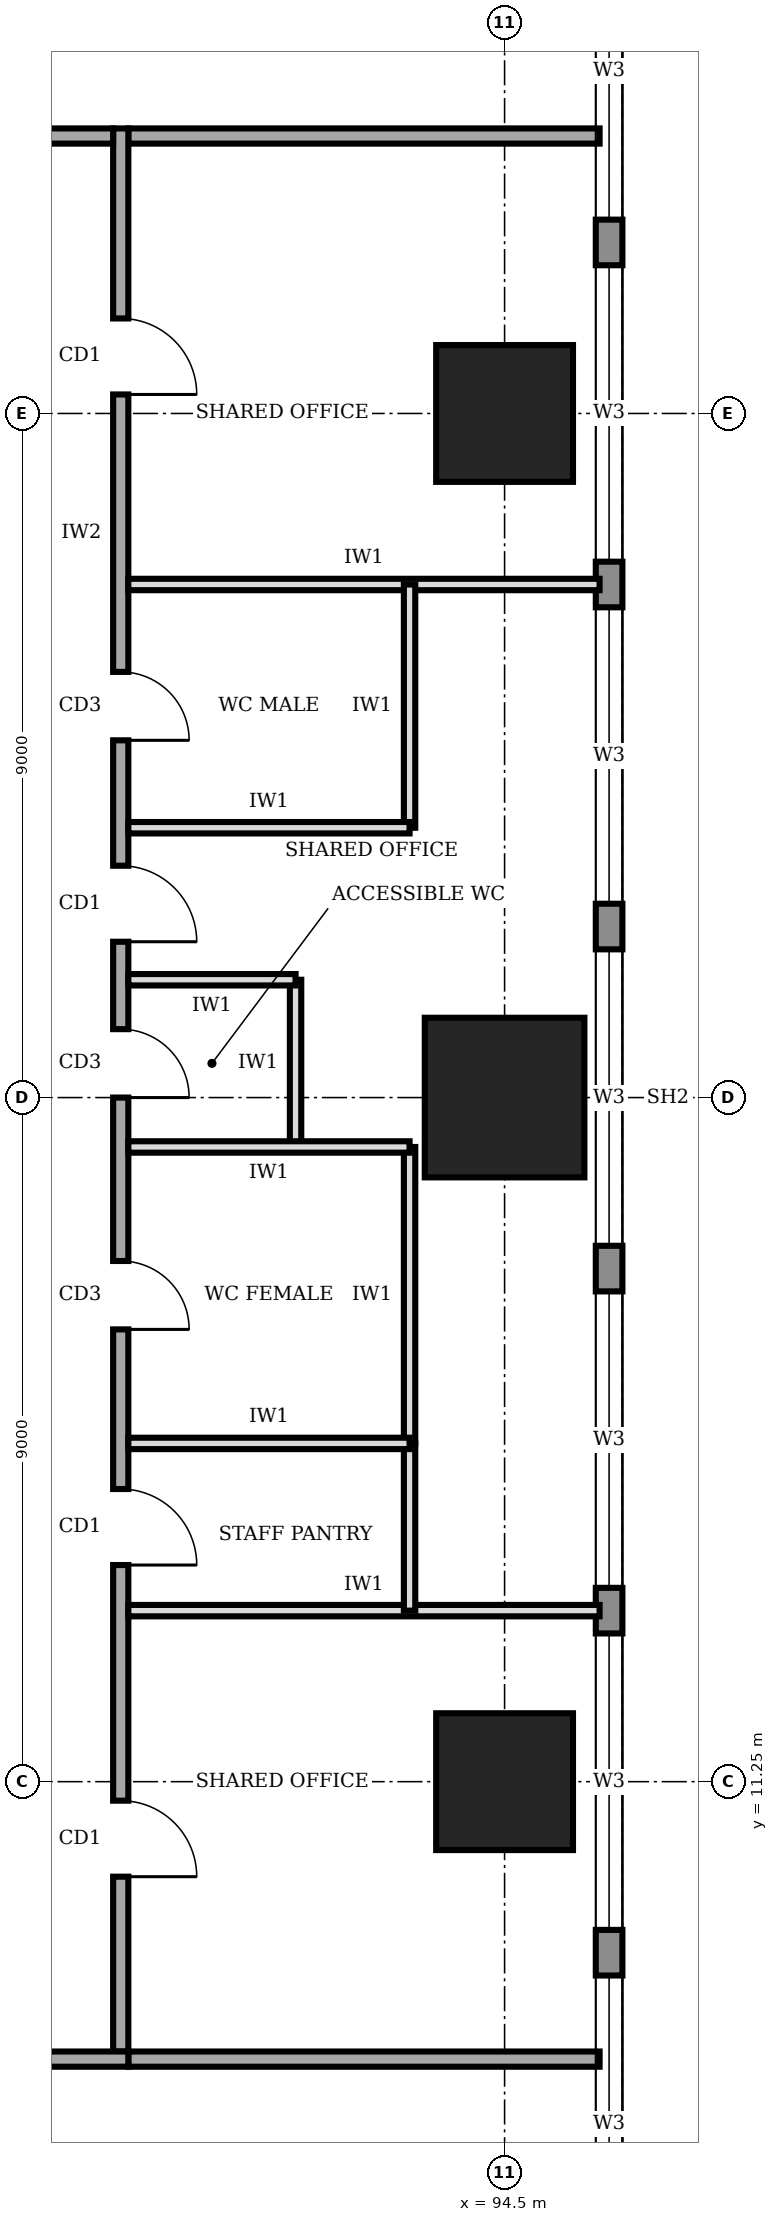
"""IFC4 building model, lengths in metres.
Left out: names, types, materials, properties, quantities, classifications, styles, units other than length and angle.
Written with IfcOpenShell. Run it as: python <this file> out.ifc"""

import sys

from ifc_helpers import new_model, si_unit, direction, frame, frame_2d, origin, origin_2d, place, context, subcontext, project, spatial, rectangle, extrude, element, fill, save


model = new_model("IFC4")
c1 = context("Model", 3, precision=1e-05, world=origin(), true_north=direction((0.0, 1.0)))
c2 = subcontext(c1, "Body", "Model", "MODEL_VIEW")
j1 = project(units=[si_unit("LENGTHUNIT", "METRE"), si_unit("PLANEANGLEUNIT", "RADIAN")], contexts=[c1])
p1 = place(None, origin())
s1 = spatial("IfcSite", under=j1, at=p1, CompositionType="ELEMENT")
p2 = place(p1, origin())
s2 = spatial("IfcBuilding", under=s1, at=p2, CompositionType="ELEMENT")
p3 = place(p2, frame((0.0, 0.0, 189.0)))
s3 = spatial("IfcBuildingStorey", under=s2, at=p3, CompositionType="ELEMENT", Elevation=189.0)
p4 = place(p3, frame((94.5, 11.25, 0.0), z_axis=(0.0, 0.0, 1.0), x_axis=(1.0, 0.0, 0.0)))
e1 = element("IfcColumn", 1, at=p4, inside=s3, PredefinedType="COLUMN", context=c2, shape_type="SweptSolid", body=[
    extrude(rectangle(XDim=1.8, YDim=1.8, at=origin_2d()), origin(), (0.0, 0.0, 1.0), 4.0),
])
p5 = place(p3, frame((94.5, 20.25, 0.0), z_axis=(0.0, 0.0, 1.0), x_axis=(1.0, 0.0, 0.0)))
e2 = element("IfcColumn", 2, at=p5, inside=s3, PredefinedType="COLUMN", context=c2, shape_type="SweptSolid", body=[
    extrude(rectangle(XDim=2.1, YDim=2.1, at=origin_2d()), origin(), (0.0, 0.0, 1.0), 4.0),
])
p6 = place(p3, frame((94.5, 29.25, 0.0), z_axis=(0.0, 0.0, 1.0), x_axis=(1.0, 0.0, 0.0)))
e3 = element("IfcColumn", 3, at=p6, inside=s3, PredefinedType="COLUMN", context=c2, shape_type="SweptSolid", body=[
    extrude(rectangle(XDim=1.8, YDim=1.8, at=origin_2d()), origin(), (0.0, 0.0, 1.0), 4.0),
])
p7 = place(p3, frame((95.875, 3.32, 0.0), z_axis=(0.0, 0.0, 1.0), x_axis=(0.0, 1.0, 0.0)))
e4 = element("IfcWall", 4, at=p7, inside=s3, PredefinedType="STANDARD", context=c2, shape_type="SweptSolid", body=[
    extrude(rectangle(XDim=33.86, YDim=0.35, at=frame_2d((16.93, 0.0))), origin(), (0.0, 0.0, 1.0), 3.75),
])
p8 = place(p7, frame((1.48, 0.0, 0.95)))
e5 = element("IfcOpeningElement", 5, at=p8, cuts=e4, PredefinedType="OPENING", context=c2, shape_type="SweptSolid", body=[
    extrude(rectangle(XDim=3.9, YDim=1.8, at=frame_2d((1.95, 0.9))), frame((0.0, 0.185, 0.0), z_axis=(0.0, -1.0, 0.0), x_axis=(1.0, 0.0, 0.0)), (0.0, 0.0, 1.0), 0.37),
])
p9 = place(p7, frame((5.98, 0.0, 0.95)))
e6 = element("IfcOpeningElement", 6, at=p9, cuts=e4, PredefinedType="OPENING", context=c2, shape_type="SweptSolid", body=[
    extrude(rectangle(XDim=3.9, YDim=1.8, at=frame_2d((1.95, 0.9))), frame((0.0, 0.185, 0.0), z_axis=(0.0, -1.0, 0.0), x_axis=(1.0, 0.0, 0.0)), (0.0, 0.0, 1.0), 0.37),
])
p10 = place(p7, frame((10.48, 0.0, 0.95)))
e7 = element("IfcOpeningElement", 7, at=p10, cuts=e4, PredefinedType="OPENING", context=c2, shape_type="SweptSolid", body=[
    extrude(rectangle(XDim=3.9, YDim=1.8, at=frame_2d((1.95, 0.9))), frame((0.0, 0.185, 0.0), z_axis=(0.0, -1.0, 0.0), x_axis=(1.0, 0.0, 0.0)), (0.0, 0.0, 1.0), 0.37),
])
p11 = place(p7, frame((14.98, 0.0, 0.95)))
e8 = element("IfcOpeningElement", 8, at=p11, cuts=e4, PredefinedType="OPENING", context=c2, shape_type="SweptSolid", body=[
    extrude(rectangle(XDim=3.9, YDim=1.8, at=frame_2d((1.95, 0.9))), frame((0.0, 0.185, 0.0), z_axis=(0.0, -1.0, 0.0), x_axis=(1.0, 0.0, 0.0)), (0.0, 0.0, 1.0), 0.37),
])
p12 = place(p7, frame((19.48, 0.0, 0.95)))
e9 = element("IfcOpeningElement", 9, at=p12, cuts=e4, PredefinedType="OPENING", context=c2, shape_type="SweptSolid", body=[
    extrude(rectangle(XDim=3.9, YDim=1.8, at=frame_2d((1.95, 0.9))), frame((0.0, 0.185, 0.0), z_axis=(0.0, -1.0, 0.0), x_axis=(1.0, 0.0, 0.0)), (0.0, 0.0, 1.0), 0.37),
])
p13 = place(p7, frame((23.98, 0.0, 0.95)))
e10 = element("IfcOpeningElement", 10, at=p13, cuts=e4, PredefinedType="OPENING", context=c2, shape_type="SweptSolid", body=[
    extrude(rectangle(XDim=3.9, YDim=1.8, at=frame_2d((1.95, 0.9))), frame((0.0, 0.185, 0.0), z_axis=(0.0, -1.0, 0.0), x_axis=(1.0, 0.0, 0.0)), (0.0, 0.0, 1.0), 0.37),
])
p14 = place(p7, frame((28.48, 0.0, 0.95)))
e11 = element("IfcOpeningElement", 11, at=p14, cuts=e4, PredefinedType="OPENING", context=c2, shape_type="SweptSolid", body=[
    extrude(rectangle(XDim=3.9, YDim=1.8, at=frame_2d((1.95, 0.9))), frame((0.0, 0.185, 0.0), z_axis=(0.0, -1.0, 0.0), x_axis=(1.0, 0.0, 0.0)), (0.0, 0.0, 1.0), 0.37),
])
p15 = place(p3, frame((72.65, 7.6, 0.0), z_axis=(0.0, 0.0, 1.0), x_axis=(1.0, 0.0, 0.0)))
e12 = element("IfcWall", 12, at=p15, inside=s3, PredefinedType="SOLIDWALL", context=c2, shape_type="SweptSolid", body=[
    extrude(rectangle(XDim=16.9, YDim=0.2, at=frame_2d((8.45, 0.0))), origin(), (0.0, 0.0, 1.0), 3.75),
])
p16 = place(p15, frame((3.575, 0.0, 0.0)))
e13 = element("IfcOpeningElement", 13, at=p16, cuts=e12, PredefinedType="OPENING", context=c2, shape_type="SweptSolid", body=[
    extrude(rectangle(XDim=1.0, YDim=2.1, at=frame_2d((0.5, 1.05))), frame((0.0, 0.11, 0.0), z_axis=(0.0, -1.0, 0.0), x_axis=(1.0, 0.0, 0.0)), (0.0, 0.0, 1.0), 0.22),
])
p17 = place(p3, frame((89.45, 7.7, 0.0), z_axis=(0.0, 0.0, 1.0), x_axis=(0.0, 1.0, 0.0)))
e14 = element("IfcWall", 14, at=p17, inside=s3, PredefinedType="SOLIDWALL", context=c2, shape_type="SweptSolid", body=[
    extrude(rectangle(XDim=25.3, YDim=0.2, at=frame_2d((12.65, 0.0))), origin(), (0.0, 0.0, 1.0), 3.75),
])
p18 = place(p17, frame((2.3, 0.0, 0.0)))
e15 = element("IfcOpeningElement", 15, at=p18, cuts=e14, PredefinedType="OPENING", context=c2, shape_type="SweptSolid", body=[
    extrude(rectangle(XDim=1.0, YDim=2.1, at=frame_2d((0.5, 1.05))), frame((0.0, 0.11, 0.0), z_axis=(0.0, -1.0, 0.0), x_axis=(1.0, 0.0, 0.0)), (0.0, 0.0, 1.0), 0.22),
])
p19 = place(p17, frame((6.4, 0.0, 0.0)))
e16 = element("IfcOpeningElement", 16, at=p19, cuts=e14, PredefinedType="OPENING", context=c2, shape_type="SweptSolid", body=[
    extrude(rectangle(XDim=1.0, YDim=2.1, at=frame_2d((0.5, 1.05))), frame((0.0, 0.11, 0.0), z_axis=(0.0, -1.0, 0.0), x_axis=(1.0, 0.0, 0.0)), (0.0, 0.0, 1.0), 0.22),
])
p20 = place(p17, frame((9.5, 0.0, 0.0)))
e17 = element("IfcOpeningElement", 17, at=p20, cuts=e14, PredefinedType="OPENING", context=c2, shape_type="SweptSolid", body=[
    extrude(rectangle(XDim=0.9, YDim=2.1, at=frame_2d((0.45, 1.05))), frame((0.0, 0.11, 0.0), z_axis=(0.0, -1.0, 0.0), x_axis=(1.0, 0.0, 0.0)), (0.0, 0.0, 1.0), 0.22),
])
p21 = place(p17, frame((12.55, 0.0, 0.0)))
e18 = element("IfcOpeningElement", 18, at=p21, cuts=e14, PredefinedType="OPENING", context=c2, shape_type="SweptSolid", body=[
    extrude(rectangle(XDim=0.9, YDim=2.1, at=frame_2d((0.45, 1.05))), frame((0.0, 0.11, 0.0), z_axis=(0.0, -1.0, 0.0), x_axis=(1.0, 0.0, 0.0)), (0.0, 0.0, 1.0), 0.22),
])
p22 = place(p17, frame((17.25, 0.0, 0.0)))
e19 = element("IfcOpeningElement", 19, at=p22, cuts=e14, PredefinedType="OPENING", context=c2, shape_type="SweptSolid", body=[
    extrude(rectangle(XDim=0.9, YDim=2.1, at=frame_2d((0.45, 1.05))), frame((0.0, 0.11, 0.0), z_axis=(0.0, -1.0, 0.0), x_axis=(1.0, 0.0, 0.0)), (0.0, 0.0, 1.0), 0.22),
])
p23 = place(p17, frame((14.6, 0.0, 0.0)))
e20 = element("IfcOpeningElement", 20, at=p23, cuts=e14, PredefinedType="OPENING", context=c2, shape_type="SweptSolid", body=[
    extrude(rectangle(XDim=1.0, YDim=2.1, at=frame_2d((0.5, 1.05))), frame((0.0, 0.11, 0.0), z_axis=(0.0, -1.0, 0.0), x_axis=(1.0, 0.0, 0.0)), (0.0, 0.0, 1.0), 0.22),
])
p24 = place(p17, frame((21.8, 0.0, 0.0)))
e21 = element("IfcOpeningElement", 21, at=p24, cuts=e14, PredefinedType="OPENING", context=c2, shape_type="SweptSolid", body=[
    extrude(rectangle(XDim=1.0, YDim=2.1, at=frame_2d((0.5, 1.05))), frame((0.0, 0.11, 0.0), z_axis=(0.0, -1.0, 0.0), x_axis=(1.0, 0.0, 0.0)), (0.0, 0.0, 1.0), 0.22),
])
p25 = place(p3, frame((89.35, 32.9, 0.0), z_axis=(0.0, 0.0, 1.0), x_axis=(-1.0, 0.0, 0.0)))
e22 = element("IfcWall", 22, at=p25, inside=s3, PredefinedType="SOLIDWALL", context=c2, shape_type="SweptSolid", body=[
    extrude(rectangle(XDim=16.9, YDim=0.2, at=frame_2d((8.45, 0.0))), origin(), (0.0, 0.0, 1.0), 3.75),
])
p26 = place(p25, frame((14.375, 0.0, 0.0)))
e23 = element("IfcOpeningElement", 23, at=p26, cuts=e22, PredefinedType="OPENING", context=c2, shape_type="SweptSolid", body=[
    extrude(rectangle(XDim=1.0, YDim=2.1, at=frame_2d((0.5, 1.05))), frame((0.0, 0.11, 0.0), z_axis=(0.0, -1.0, 0.0), x_axis=(1.0, 0.0, 0.0)), (0.0, 0.0, 1.0), 0.22),
])
for number, where, z_axis, x_axis in (
    (24, (89.55, 7.6, 0.0), (0.0, 0.0, 1.0), (1.0, 0.0, 0.0)),
    (25, (89.55, 32.9, 0.0), (0.0, 0.0, 1.0), (1.0, 0.0, 0.0)),
):
    element("IfcWall", number, at=place(p3, frame(where, z_axis=z_axis, x_axis=x_axis)), inside=s3, PredefinedType="SOLIDWALL", context=c2, shape_type="SweptSolid", body=[
        extrude(rectangle(XDim=6.2, YDim=0.2, at=frame_2d((3.1, 0.0))), origin(), (0.0, 0.0, 1.0), 3.75),
    ])
for number, where, z_axis, x_axis in (
    (26, (89.55, 13.5, 0.0), (0.0, 0.0, 1.0), (1.0, 0.0, 0.0)),
    (27, (89.55, 27.0, 0.0), (0.0, 0.0, 1.0), (1.0, 0.0, 0.0)),
):
    element("IfcWall", number, at=place(p3, frame(where, z_axis=z_axis, x_axis=x_axis)), inside=s3, PredefinedType="PARTITIONING", context=c2, shape_type="SweptSolid", body=[
        extrude(rectangle(XDim=6.2, YDim=0.15, at=frame_2d((3.1, 0.0))), origin(), (0.0, 0.0, 1.0), 3.75),
    ])
p27 = place(p3, frame((89.55, 15.7, 0.0), z_axis=(0.0, 0.0, 1.0), x_axis=(1.0, 0.0, 0.0)))
e28 = element("IfcWall", 28, at=p27, inside=s3, PredefinedType="PARTITIONING", context=c2, shape_type="SweptSolid", body=[
    extrude(rectangle(XDim=3.7, YDim=0.15, at=frame_2d((1.85, 0.0))), origin(), (0.0, 0.0, 1.0), 3.75),
])
p28 = place(p3, frame((89.55, 19.6, 0.0), z_axis=(0.0, 0.0, 1.0), x_axis=(1.0, 0.0, 0.0)))
e29 = element("IfcWall", 29, at=p28, inside=s3, PredefinedType="PARTITIONING", context=c2, shape_type="SweptSolid", body=[
    extrude(rectangle(XDim=3.7, YDim=0.15, at=frame_2d((1.85, 0.0))), origin(), (0.0, 0.0, 1.0), 2.85),
])
p29 = place(p3, frame((89.55, 21.8, 0.0), z_axis=(0.0, 0.0, 1.0), x_axis=(1.0, 0.0, 0.0)))
e30 = element("IfcWall", 30, at=p29, inside=s3, PredefinedType="PARTITIONING", context=c2, shape_type="SweptSolid", body=[
    extrude(rectangle(XDim=2.2, YDim=0.15, at=frame_2d((1.1, 0.0))), origin(), (0.0, 0.0, 1.0), 3.75),
])
p30 = place(p3, frame((89.55, 23.8, 0.0), z_axis=(0.0, 0.0, 1.0), x_axis=(1.0, 0.0, 0.0)))
e31 = element("IfcWall", 31, at=p30, inside=s3, PredefinedType="PARTITIONING", context=c2, shape_type="SweptSolid", body=[
    extrude(rectangle(XDim=3.7, YDim=0.15, at=frame_2d((1.85, 0.0))), origin(), (0.0, 0.0, 1.0), 3.75),
])
p31 = place(p3, frame((93.25, 13.5, 0.0), z_axis=(0.0, 0.0, 1.0), x_axis=(0.0, 1.0, 0.0)))
e32 = element("IfcWall", 32, at=p31, inside=s3, PredefinedType="PARTITIONING", context=c2, shape_type="SweptSolid", body=[
    extrude(rectangle(XDim=2.2, YDim=0.15, at=frame_2d((1.1, 0.0))), origin(), (0.0, 0.0, 1.0), 3.75),
])
p32 = place(p3, frame((93.25, 15.7, 0.0), z_axis=(0.0, 0.0, 1.0), x_axis=(0.0, 1.0, 0.0)))
e33 = element("IfcWall", 33, at=p32, inside=s3, PredefinedType="PARTITIONING", context=c2, shape_type="SweptSolid", body=[
    extrude(rectangle(XDim=3.9, YDim=0.15, at=frame_2d((1.95, 0.0))), origin(), (0.0, 0.0, 1.0), 3.75),
])
p33 = place(p3, frame((91.75, 19.6, 0.0), z_axis=(0.0, 0.0, 1.0), x_axis=(0.0, 1.0, 0.0)))
e34 = element("IfcWall", 34, at=p33, inside=s3, PredefinedType="PARTITIONING", context=c2, shape_type="SweptSolid", body=[
    extrude(rectangle(XDim=2.2, YDim=0.15, at=frame_2d((1.1, 0.0))), origin(), (0.0, 0.0, 1.0), 3.75),
])
p34 = place(p3, frame((93.25, 23.8, 0.0), z_axis=(0.0, 0.0, 1.0), x_axis=(0.0, 1.0, 0.0)))
e35 = element("IfcWall", 35, at=p34, inside=s3, PredefinedType="PARTITIONING", context=c2, shape_type="SweptSolid", body=[
    extrude(rectangle(XDim=3.2, YDim=0.15, at=frame_2d((1.6, 0.0))), origin(), (0.0, 0.0, 1.0), 3.75),
])
p35 = place(p8, origin())
e36 = element("IfcWindow", 36, at=p35, inside=s3, PartitioningType="SINGLE_PANEL", PredefinedType="WINDOW", context=c2, shape_type="SweptSolid", body=[
    extrude(rectangle(XDim=3.9, YDim=1.8, at=frame_2d((1.95, 0.9))), frame((0.0, 0.03, 0.0), z_axis=(0.0, -1.0, 0.0), x_axis=(1.0, 0.0, 0.0)), (0.0, 0.0, 1.0), 0.06),
])
fill(e5, e36)
p36 = place(p9, origin())
e37 = element("IfcWindow", 37, at=p36, inside=s3, PartitioningType="SINGLE_PANEL", PredefinedType="WINDOW", context=c2, shape_type="SweptSolid", body=[
    extrude(rectangle(XDim=3.9, YDim=1.8, at=frame_2d((1.95, 0.9))), frame((0.0, 0.03, 0.0), z_axis=(0.0, -1.0, 0.0), x_axis=(1.0, 0.0, 0.0)), (0.0, 0.0, 1.0), 0.06),
])
fill(e6, e37)
p37 = place(p10, origin())
e38 = element("IfcWindow", 38, at=p37, inside=s3, PartitioningType="SINGLE_PANEL", PredefinedType="WINDOW", context=c2, shape_type="SweptSolid", body=[
    extrude(rectangle(XDim=3.9, YDim=1.8, at=frame_2d((1.95, 0.9))), frame((0.0, 0.03, 0.0), z_axis=(0.0, -1.0, 0.0), x_axis=(1.0, 0.0, 0.0)), (0.0, 0.0, 1.0), 0.06),
])
fill(e7, e38)
p38 = place(p11, origin())
e39 = element("IfcWindow", 39, at=p38, inside=s3, PartitioningType="SINGLE_PANEL", PredefinedType="WINDOW", context=c2, shape_type="SweptSolid", body=[
    extrude(rectangle(XDim=3.9, YDim=1.8, at=frame_2d((1.95, 0.9))), frame((0.0, 0.03, 0.0), z_axis=(0.0, -1.0, 0.0), x_axis=(1.0, 0.0, 0.0)), (0.0, 0.0, 1.0), 0.06),
])
fill(e8, e39)
p39 = place(p12, origin())
e40 = element("IfcWindow", 40, at=p39, inside=s3, PartitioningType="SINGLE_PANEL", PredefinedType="WINDOW", context=c2, shape_type="SweptSolid", body=[
    extrude(rectangle(XDim=3.9, YDim=1.8, at=frame_2d((1.95, 0.9))), frame((0.0, 0.03, 0.0), z_axis=(0.0, -1.0, 0.0), x_axis=(1.0, 0.0, 0.0)), (0.0, 0.0, 1.0), 0.06),
])
fill(e9, e40)
p40 = place(p13, origin())
e41 = element("IfcWindow", 41, at=p40, inside=s3, PartitioningType="SINGLE_PANEL", PredefinedType="WINDOW", context=c2, shape_type="SweptSolid", body=[
    extrude(rectangle(XDim=3.9, YDim=1.8, at=frame_2d((1.95, 0.9))), frame((0.0, 0.03, 0.0), z_axis=(0.0, -1.0, 0.0), x_axis=(1.0, 0.0, 0.0)), (0.0, 0.0, 1.0), 0.06),
])
fill(e10, e41)
p41 = place(p14, origin())
e42 = element("IfcWindow", 42, at=p41, inside=s3, PartitioningType="SINGLE_PANEL", PredefinedType="WINDOW", context=c2, shape_type="SweptSolid", body=[
    extrude(rectangle(XDim=3.9, YDim=1.8, at=frame_2d((1.95, 0.9))), frame((0.0, 0.03, 0.0), z_axis=(0.0, -1.0, 0.0), x_axis=(1.0, 0.0, 0.0)), (0.0, 0.0, 1.0), 0.06),
])
fill(e11, e42)
p42 = place(p18, frame((1.0, 0.0, 0.0), z_axis=(0.0, 0.0, 1.0), x_axis=(-1.0, 0.0, 0.0)))
e43 = element("IfcDoor", 43, at=p42, inside=s3, OperationType="SINGLE_SWING_RIGHT", PredefinedType="DOOR", context=c2, shape_type="SweptSolid", body=[
    extrude(rectangle(XDim=1.0, YDim=2.1, at=frame_2d((0.5, 1.05))), frame((0.0, 0.025, 0.0), z_axis=(0.0, -1.0, 0.0), x_axis=(1.0, 0.0, 0.0)), (0.0, 0.0, 1.0), 0.05),
])
fill(e15, e43)
p43 = place(p19, frame((1.0, 0.0, 0.0), z_axis=(0.0, 0.0, 1.0), x_axis=(-1.0, 0.0, 0.0)))
e44 = element("IfcDoor", 44, at=p43, inside=s3, OperationType="SINGLE_SWING_RIGHT", PredefinedType="DOOR", context=c2, shape_type="SweptSolid", body=[
    extrude(rectangle(XDim=1.0, YDim=2.1, at=frame_2d((0.5, 1.05))), frame((0.0, 0.025, 0.0), z_axis=(0.0, -1.0, 0.0), x_axis=(1.0, 0.0, 0.0)), (0.0, 0.0, 1.0), 0.05),
])
fill(e16, e44)
p44 = place(p20, frame((0.9, 0.0, 0.0), z_axis=(0.0, 0.0, 1.0), x_axis=(-1.0, 0.0, 0.0)))
e45 = element("IfcDoor", 45, at=p44, inside=s3, OperationType="SINGLE_SWING_RIGHT", PredefinedType="DOOR", context=c2, shape_type="SweptSolid", body=[
    extrude(rectangle(XDim=0.9, YDim=2.1, at=frame_2d((0.45, 1.05))), frame((0.0, 0.025, 0.0), z_axis=(0.0, -1.0, 0.0), x_axis=(1.0, 0.0, 0.0)), (0.0, 0.0, 1.0), 0.05),
])
fill(e17, e45)
p45 = place(p21, frame((0.9, 0.0, 0.0), z_axis=(0.0, 0.0, 1.0), x_axis=(-1.0, 0.0, 0.0)))
e46 = element("IfcDoor", 46, at=p45, inside=s3, OperationType="SINGLE_SWING_RIGHT", PredefinedType="DOOR", context=c2, shape_type="SweptSolid", body=[
    extrude(rectangle(XDim=0.9, YDim=2.1, at=frame_2d((0.45, 1.05))), frame((0.0, 0.025, 0.0), z_axis=(0.0, -1.0, 0.0), x_axis=(1.0, 0.0, 0.0)), (0.0, 0.0, 1.0), 0.05),
])
fill(e18, e46)
p46 = place(p22, frame((0.9, 0.0, 0.0), z_axis=(0.0, 0.0, 1.0), x_axis=(-1.0, 0.0, 0.0)))
e47 = element("IfcDoor", 47, at=p46, inside=s3, OperationType="SINGLE_SWING_RIGHT", PredefinedType="DOOR", context=c2, shape_type="SweptSolid", body=[
    extrude(rectangle(XDim=0.9, YDim=2.1, at=frame_2d((0.45, 1.05))), frame((0.0, 0.025, 0.0), z_axis=(0.0, -1.0, 0.0), x_axis=(1.0, 0.0, 0.0)), (0.0, 0.0, 1.0), 0.05),
])
fill(e19, e47)
p47 = place(p23, frame((1.0, 0.0, 0.0), z_axis=(0.0, 0.0, 1.0), x_axis=(-1.0, 0.0, 0.0)))
e48 = element("IfcDoor", 48, at=p47, inside=s3, OperationType="SINGLE_SWING_RIGHT", PredefinedType="DOOR", context=c2, shape_type="SweptSolid", body=[
    extrude(rectangle(XDim=1.0, YDim=2.1, at=frame_2d((0.5, 1.05))), frame((0.0, 0.025, 0.0), z_axis=(0.0, -1.0, 0.0), x_axis=(1.0, 0.0, 0.0)), (0.0, 0.0, 1.0), 0.05),
])
fill(e20, e48)
p48 = place(p24, frame((1.0, 0.0, 0.0), z_axis=(0.0, 0.0, 1.0), x_axis=(-1.0, 0.0, 0.0)))
e49 = element("IfcDoor", 49, at=p48, inside=s3, OperationType="SINGLE_SWING_RIGHT", PredefinedType="DOOR", context=c2, shape_type="SweptSolid", body=[
    extrude(rectangle(XDim=1.0, YDim=2.1, at=frame_2d((0.5, 1.05))), frame((0.0, 0.025, 0.0), z_axis=(0.0, -1.0, 0.0), x_axis=(1.0, 0.0, 0.0)), (0.0, 0.0, 1.0), 0.05),
])
fill(e21, e49)
save(model, sys.argv[1])
